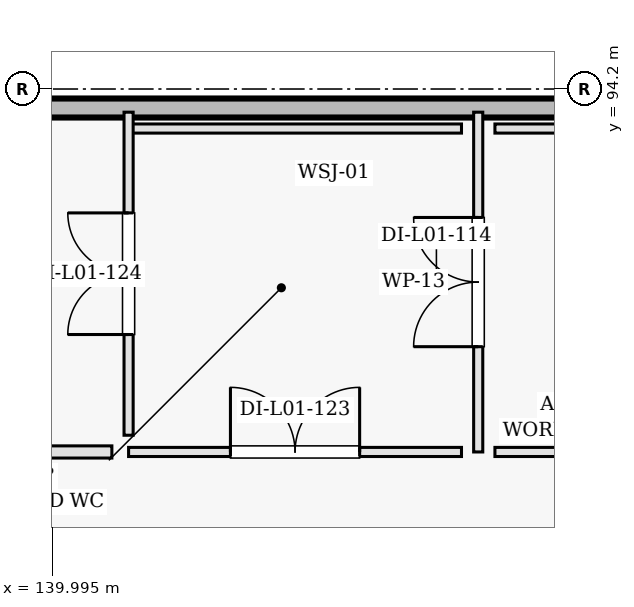
"""IFC4 building model, lengths in metres.
Left out: names, types, materials, properties, quantities, classifications, styles, units other than length and angle.
Written with IfcOpenShell. Run it as: python <this file> out.ifc"""

import sys

from ifc_helpers import new_model, si_unit, direction, frame, frame_2d, origin, place, context, subcontext, project, spatial, rectangle, extrude, element, fill, save


model = new_model("IFC4")
c1 = context("Model", 3, precision=1e-05, world=origin(), true_north=direction((0.0, 1.0)))
c2 = subcontext(c1, "Body", "Model", "MODEL_VIEW")
j1 = project(units=[si_unit("LENGTHUNIT", "METRE"), si_unit("PLANEANGLEUNIT", "RADIAN")], contexts=[c1])
p1 = place(None, origin())
s1 = spatial("IfcSite", under=j1, at=p1, CompositionType="ELEMENT")
p2 = place(p1, origin())
s2 = spatial("IfcBuilding", under=s1, at=p2, CompositionType="ELEMENT")
p3 = place(p2, frame((0.0, 0.0, 4.8)))
s3 = spatial("IfcBuildingStorey", under=s2, at=p3, CompositionType="ELEMENT", Elevation=4.8)
p4 = place(p3, frame((175.2, 93.95, 0.0), z_axis=(0.0, 0.0, 1.0), x_axis=(-1.0, 0.0, 0.0)))
e1 = element("IfcWall", 1, at=p4, inside=s3, PredefinedType="SHEAR", context=c2, shape_type="SweptSolid", body=[
    extrude(rectangle(XDim=63.0, YDim=0.25, at=frame_2d((31.5, 0.0))), origin(), (0.0, 0.0, 1.0), 4.8),
])
p5 = place(p3, frame((145.6, 89.425, 0.0), z_axis=(0.0, 0.0, 1.0), x_axis=(0.0, 1.0, 0.0)))
e2 = element("IfcWall", 2, at=p5, inside=s3, PredefinedType="PARTITIONING", context=c2, shape_type="SweptSolid", body=[
    extrude(rectangle(XDim=4.47, YDim=0.12, at=frame_2d((2.235, 0.0))), origin(), (0.0, 0.0, 1.0), 4.48),
])
p6 = place(p5, frame((1.385, 0.0, 0.0)))
e3 = element("IfcOpeningElement", 3, at=p6, cuts=e2, PredefinedType="OPENING", context=c2, shape_type="SweptSolid", body=[
    extrude(rectangle(XDim=1.7, YDim=2.2, at=frame_2d((0.85, 1.1))), frame((0.0, 0.07, 0.0), z_axis=(0.0, -1.0, 0.0), x_axis=(1.0, 0.0, 0.0)), (0.0, 0.0, 1.0), 0.14),
])
for number, where, z_axis, x_axis in (
    (4, (145.82, 89.425, 0.0), (0.0, 0.0, 1.0), (1.0, 0.0, 0.0)),
    (5, (145.82, 93.68, 0.0), (0.0, 0.0, 1.0), (1.0, 0.0, 0.0)),
):
    element("IfcWall", number, at=place(p3, frame(where, z_axis=z_axis, x_axis=x_axis)), inside=s3, PredefinedType="PARTITIONING", context=c2, shape_type="SweptSolid", body=[
        extrude(rectangle(XDim=2.98, YDim=0.12, at=frame_2d((1.49, 0.0))), origin(), (0.0, 0.0, 1.0), 4.48),
    ])
p7 = place(p3, frame((141.0, 93.68, 0.0), z_axis=(0.0, 0.0, 1.0), x_axis=(1.0, 0.0, 0.0)))
e6 = element("IfcWall", 6, at=p7, inside=s3, PredefinedType="PARTITIONING", context=c2, shape_type="SweptSolid", body=[
    extrude(rectangle(XDim=4.38, YDim=0.12, at=frame_2d((2.19, 0.0))), origin(), (0.0, 0.0, 1.0), 4.48),
])
p8 = place(p3, frame((141.0, 89.425, 0.0), z_axis=(0.0, 0.0, 1.0), x_axis=(1.0, 0.0, 0.0)))
e7 = element("IfcWall", 7, at=p8, inside=s3, PredefinedType="PARTITIONING", context=c2, shape_type="SweptSolid", body=[
    extrude(rectangle(XDim=4.38, YDim=0.12, at=frame_2d((2.19, 0.0))), origin(), (0.0, 0.0, 1.0), 4.48),
])
p9 = place(p8, frame((1.34, 0.0, 0.0)))
e8 = element("IfcOpeningElement", 8, at=p9, cuts=e7, PredefinedType="OPENING", context=c2, shape_type="SweptSolid", body=[
    extrude(rectangle(XDim=1.7, YDim=2.2, at=frame_2d((0.85, 1.1))), frame((0.0, 0.07, 0.0), z_axis=(0.0, -1.0, 0.0), x_axis=(1.0, 0.0, 0.0)), (0.0, 0.0, 1.0), 0.14),
])
p10 = place(p3, frame((141.0, 89.645, 0.0), z_axis=(0.0, 0.0, 1.0), x_axis=(0.0, 1.0, 0.0)))
e9 = element("IfcWall", 9, at=p10, inside=s3, PredefinedType="PARTITIONING", context=c2, shape_type="SweptSolid", body=[
    extrude(rectangle(XDim=4.25, YDim=0.12, at=frame_2d((2.125, 0.0))), origin(), (0.0, 0.0, 1.0), 4.48),
])
p11 = place(p10, frame((1.325, 0.0, 0.0)))
e10 = element("IfcOpeningElement", 10, at=p11, cuts=e9, PredefinedType="OPENING", context=c2, shape_type="SweptSolid", body=[
    extrude(rectangle(XDim=1.6, YDim=2.2, at=frame_2d((0.8, 1.1))), frame((0.0, 0.07, 0.0), z_axis=(0.0, -1.0, 0.0), x_axis=(1.0, 0.0, 0.0)), (0.0, 0.0, 1.0), 0.14),
])
p12 = place(p3, frame((130.15, 89.425, 0.0), z_axis=(0.0, 0.0, 1.0), x_axis=(1.0, 0.0, 0.0)))
e11 = element("IfcWall", 11, at=p12, inside=s3, PredefinedType="PARTITIONING", context=c2, shape_type="SweptSolid", body=[
    extrude(rectangle(XDim=10.63, YDim=0.16, at=frame_2d((5.315, 0.0))), origin(), (0.0, 0.0, 1.0), 4.48),
])
p13 = place(p6, origin())
e12 = element("IfcDoor", 12, at=p13, inside=s3, OperationType="DOUBLE_DOOR_SINGLE_SWING", PredefinedType="DOOR", context=c2, shape_type="SweptSolid", body=[
    extrude(rectangle(XDim=1.7, YDim=2.2, at=frame_2d((0.85, 1.1))), frame((0.0, 0.025, 0.0), z_axis=(0.0, -1.0, 0.0), x_axis=(1.0, 0.0, 0.0)), (0.0, 0.0, 1.0), 0.05),
])
fill(e3, e12)
p14 = place(p9, origin())
e13 = element("IfcDoor", 13, at=p14, inside=s3, OperationType="DOUBLE_DOOR_SINGLE_SWING", PredefinedType="DOOR", context=c2, shape_type="SweptSolid", body=[
    extrude(rectangle(XDim=1.7, YDim=2.2, at=frame_2d((0.85, 1.1))), frame((0.0, 0.025, 0.0), z_axis=(0.0, -1.0, 0.0), x_axis=(1.0, 0.0, 0.0)), (0.0, 0.0, 1.0), 0.05),
])
fill(e8, e13)
p15 = place(p11, origin())
e14 = element("IfcDoor", 14, at=p15, inside=s3, OperationType="DOUBLE_DOOR_SINGLE_SWING", PredefinedType="DOOR", context=c2, shape_type="SweptSolid", body=[
    extrude(rectangle(XDim=1.6, YDim=2.2, at=frame_2d((0.8, 1.1))), frame((0.0, 0.025, 0.0), z_axis=(0.0, -1.0, 0.0), x_axis=(1.0, 0.0, 0.0)), (0.0, 0.0, 1.0), 0.05),
])
fill(e10, e14)
save(model, sys.argv[1])
